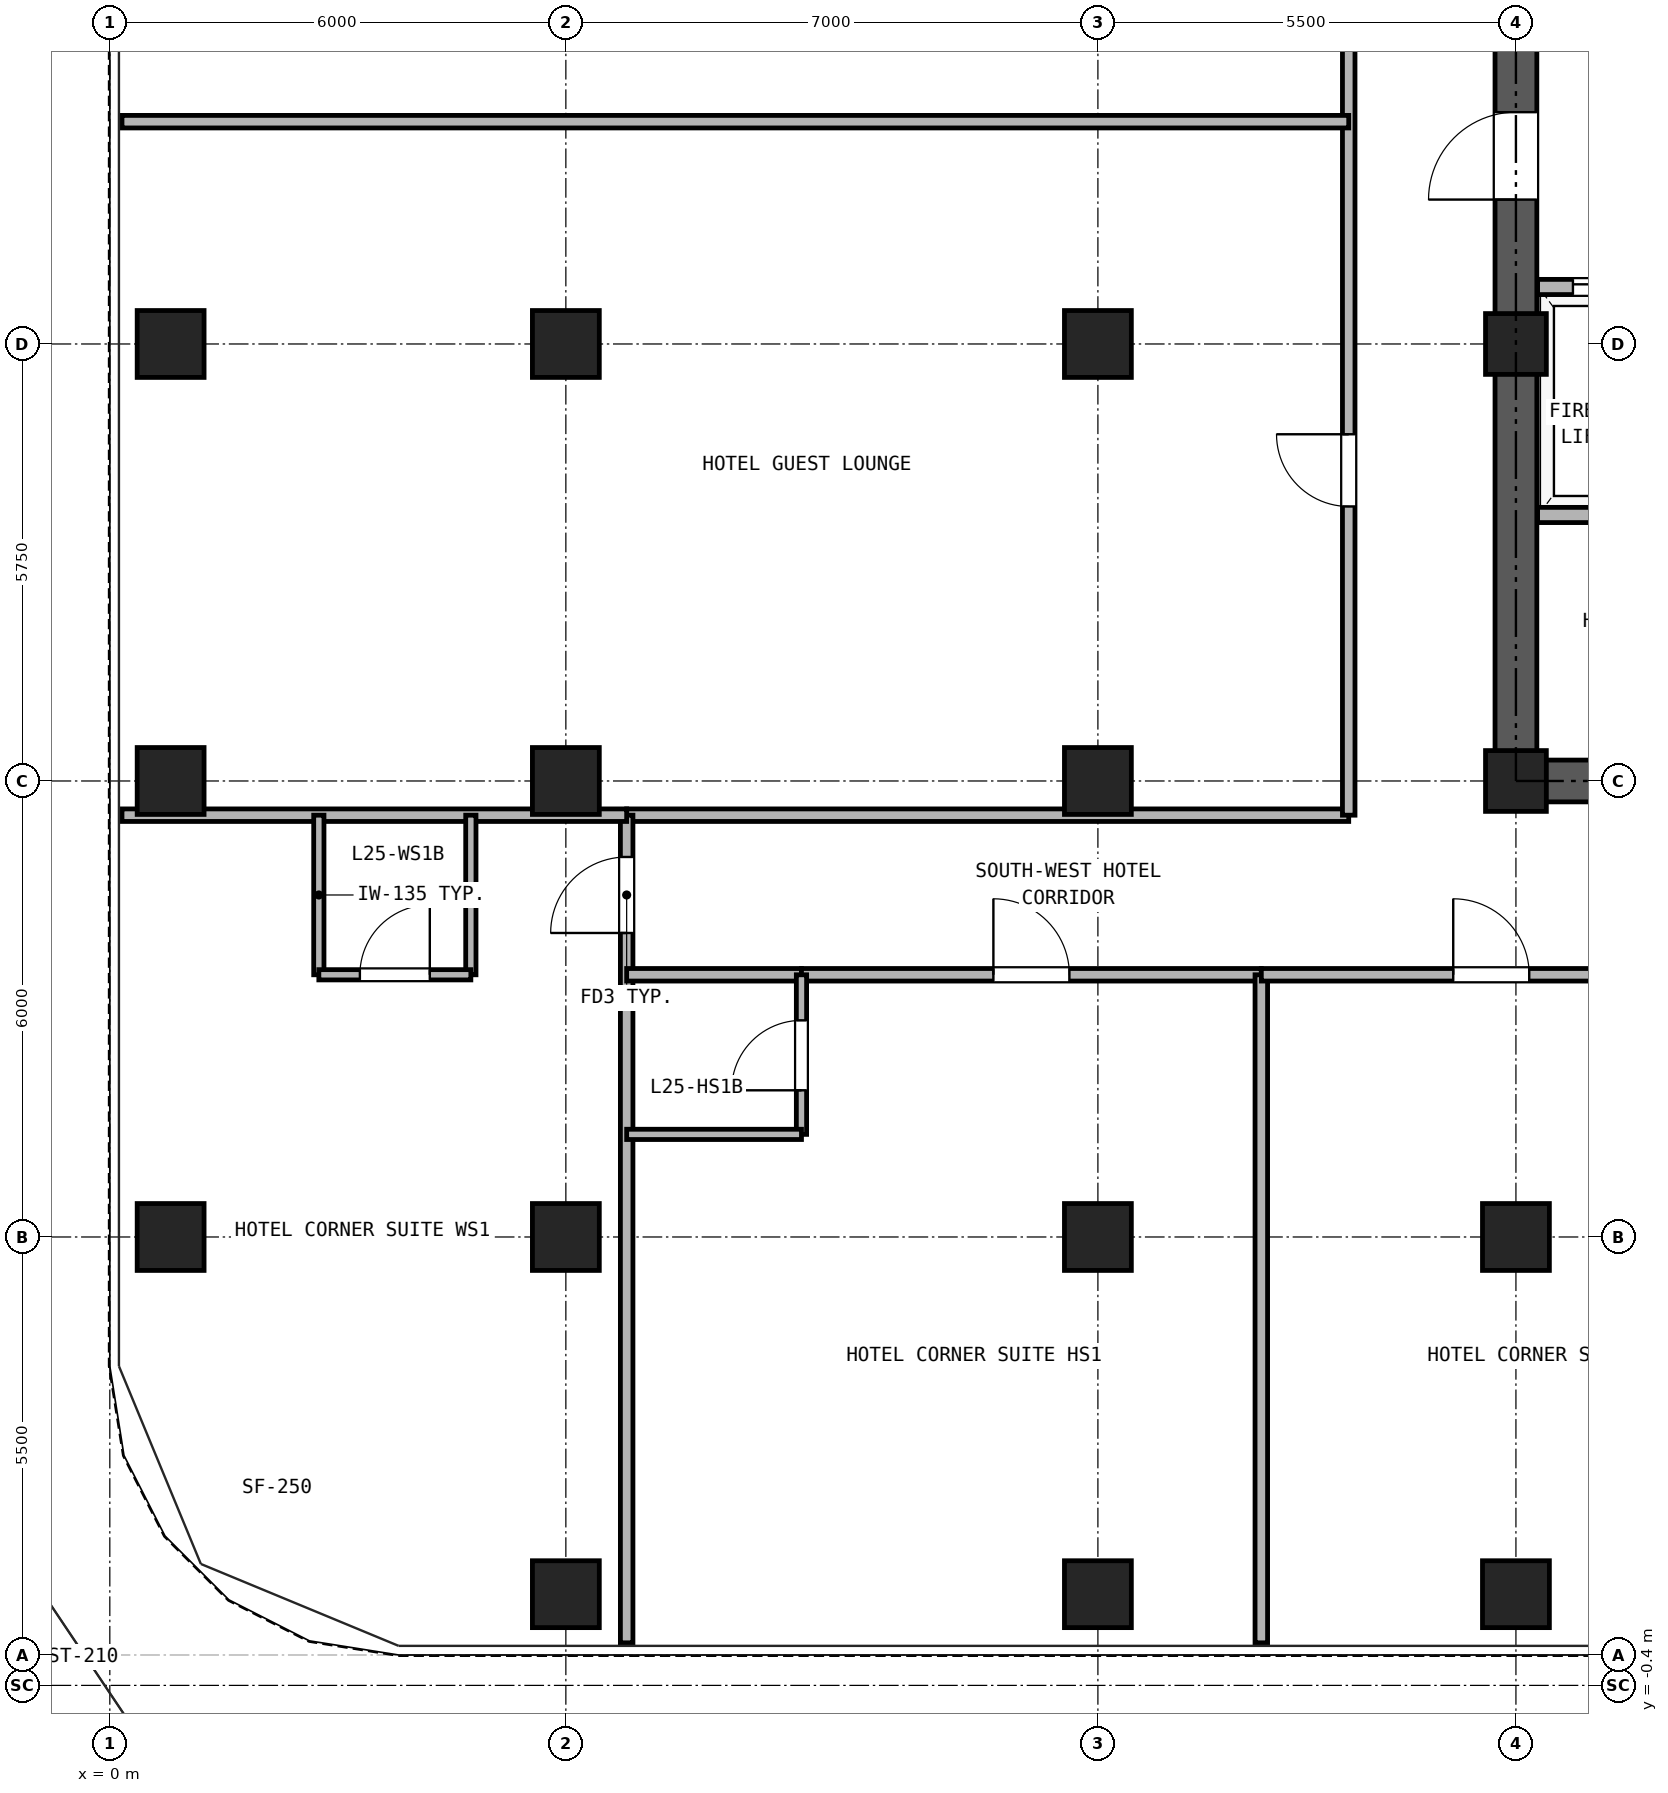
"""IFC4 building model, lengths in metres.
Left out: names, types, materials, properties, quantities, classifications, styles, units other than length and angle.
Written with IfcOpenShell. Run it as: python <this file> out.ifc"""

import sys

from ifc_helpers import new_model, si_unit, direction, frame, frame_2d, origin, origin_2d, place, context, subcontext, project, spatial, rectangle, hollow_rectangle, extrude, source, transform, mapped, element, fill, save


model = new_model("IFC4")
c1 = context("Model", 3, precision=1e-05, world=origin(), true_north=direction((0.0, 1.0)))
c2 = subcontext(c1, "Body", "Model", "MODEL_VIEW")
j1 = project(units=[si_unit("LENGTHUNIT", "METRE"), si_unit("PLANEANGLEUNIT", "RADIAN")], contexts=[c1])
p1 = place(None, origin())
s1 = spatial("IfcSite", under=j1, at=p1, CompositionType="ELEMENT")
p2 = place(p1, origin())
s2 = spatial("IfcBuilding", under=s1, at=p2, CompositionType="ELEMENT")
p3 = place(p2, frame((0.0, 0.0, 95.9)))
s3 = spatial("IfcBuildingStorey", under=s2, at=p3, CompositionType="ELEMENT", Elevation=95.9)
m1 = source(origin(), c2, "Body", "SweptSolid", [
    extrude(hollow_rectangle(XDim=0.88, YDim=0.88, WallThickness=0.05, at=origin_2d()), origin(), (0.0, 0.0, 1.0), 2.95),
])
for number, where, z_axis, x_axis in (
    (1, (6.0, 0.8, 0.0), (0.0, 0.0, 1.0), (1.0, 0.0, 0.0)),
    (2, (13.0, 0.8, 0.0), (0.0, 0.0, 1.0), (1.0, 0.0, 0.0)),
    (3, (18.5, 0.8, 0.0), (0.0, 0.0, 1.0), (1.0, 0.0, 0.0)),
    (4, (0.8, 5.5, 0.0), (0.0, 0.0, 1.0), (1.0, 0.0, 0.0)),
    (5, (0.8, 11.5, 0.0), (0.0, 0.0, 1.0), (1.0, 0.0, 0.0)),
    (6, (0.8, 17.25, 0.0), (0.0, 0.0, 1.0), (1.0, 0.0, 0.0)),
    (7, (6.0, 5.5, 0.0), (0.0, 0.0, 1.0), (1.0, 0.0, 0.0)),
    (8, (6.0, 11.5, 0.0), (0.0, 0.0, 1.0), (1.0, 0.0, 0.0)),
    (9, (6.0, 17.25, 0.0), (0.0, 0.0, 1.0), (1.0, 0.0, 0.0)),
    (10, (13.0, 5.5, 0.0), (0.0, 0.0, 1.0), (1.0, 0.0, 0.0)),
    (11, (13.0, 11.5, 0.0), (0.0, 0.0, 1.0), (1.0, 0.0, 0.0)),
    (12, (13.0, 17.25, 0.0), (0.0, 0.0, 1.0), (1.0, 0.0, 0.0)),
    (13, (18.5, 5.5, 0.0), (0.0, 0.0, 1.0), (1.0, 0.0, 0.0)),
):
    element("IfcColumn", number, at=place(p3, frame(where, z_axis=z_axis, x_axis=x_axis)), inside=s3, PredefinedType="COLUMN", context=c2, shape_type="MappedRepresentation", body=[
        mapped(m1, transform((0.0, 0.0, 0.0), x_axis=(1.0, 0.0, 0.0), y_axis=(0.0, 1.0, 0.0), z_axis=(0.0, 0.0, 1.0), scale=1.0)),
    ])
m2 = source(origin(), c2, "Body", "SweptSolid", [
    extrude(hollow_rectangle(XDim=0.8, YDim=0.8, WallThickness=0.045, at=origin_2d()), origin(), (0.0, 0.0, 1.0), 2.95),
])
for number, where, z_axis, x_axis in (
    (14, (18.5, 11.5, 0.0), (0.0, 0.0, 1.0), (1.0, 0.0, 0.0)),
    (15, (18.5, 17.25, 0.0), (0.0, 0.0, 1.0), (1.0, 0.0, 0.0)),
):
    element("IfcColumn", number, at=place(p3, frame(where, z_axis=z_axis, x_axis=x_axis)), inside=s3, PredefinedType="COLUMN", context=c2, shape_type="MappedRepresentation", body=[
        mapped(m2, transform((0.0, 0.0, 0.0), x_axis=(1.0, 0.0, 0.0), y_axis=(0.0, 1.0, 0.0), z_axis=(0.0, 0.0, 1.0), scale=1.0)),
    ])
p4 = place(p3, frame((18.225, 11.5, 0.0), z_axis=(0.0, 0.0, 1.0), x_axis=(1.0, 0.0, 0.0)))
e16 = element("IfcWall", 16, at=p4, inside=s3, PredefinedType="SHEAR", context=c2, shape_type="SweptSolid", body=[
    extrude(rectangle(XDim=10.55, YDim=0.55, at=frame_2d((5.275, 0.0))), origin(), (0.0, 0.0, 1.0), 2.95),
])
p5 = place(p4, frame((2.375, 0.0, 0.0)))
e17 = element("IfcOpeningElement", 17, at=p5, cuts=e16, PredefinedType="OPENING", context=c2, shape_type="SweptSolid", body=[
    extrude(rectangle(XDim=0.95, YDim=2.15, at=frame_2d((0.475, 1.075))), frame((0.0, 0.285, 0.0), z_axis=(0.0, -1.0, 0.0), x_axis=(1.0, 0.0, 0.0)), (0.0, 0.0, 1.0), 0.57),
])
p6 = place(p4, frame((5.875, 0.0, 0.0)))
e18 = element("IfcOpeningElement", 18, at=p6, cuts=e16, PredefinedType="OPENING", context=c2, shape_type="SweptSolid", body=[
    extrude(rectangle(XDim=1.1, YDim=2.25, at=frame_2d((0.55, 1.125))), frame((0.0, 0.285, 0.0), z_axis=(0.0, -1.0, 0.0), x_axis=(1.0, 0.0, 0.0)), (0.0, 0.0, 1.0), 0.57),
])
p7 = place(p4, frame((8.275, 0.0, 0.0)))
e19 = element("IfcOpeningElement", 19, at=p7, cuts=e16, PredefinedType="OPENING", context=c2, shape_type="SweptSolid", body=[
    extrude(rectangle(XDim=1.1, YDim=2.25, at=frame_2d((0.55, 1.125))), frame((0.0, 0.285, 0.0), z_axis=(0.0, -1.0, 0.0), x_axis=(1.0, 0.0, 0.0)), (0.0, 0.0, 1.0), 0.57),
])
p8 = place(p3, frame((18.5, 11.775, 0.0), z_axis=(0.0, 0.0, 1.0), x_axis=(0.0, 1.0, 0.0)))
e20 = element("IfcWall", 20, at=p8, inside=s3, PredefinedType="SHEAR", context=c2, shape_type="SweptSolid", body=[
    extrude(rectangle(XDim=16.7, YDim=0.55, at=frame_2d((8.35, 0.0))), origin(), (0.0, 0.0, 1.0), 2.95),
])
p9 = place(p8, frame((7.375, 0.0, 0.0)))
e21 = element("IfcOpeningElement", 21, at=p9, cuts=e20, PredefinedType="OPENING", context=c2, shape_type="SweptSolid", body=[
    extrude(rectangle(XDim=1.15, YDim=2.2, at=frame_2d((0.575, 1.1))), frame((0.0, 0.285, 0.0), z_axis=(0.0, -1.0, 0.0), x_axis=(1.0, 0.0, 0.0)), (0.0, 0.0, 1.0), 0.57),
])
p10 = place(p3, frame((18.785, 18.0, 0.0), z_axis=(0.0, 0.0, 1.0), x_axis=(1.0, 0.0, 0.0)))
e22 = element("IfcWall", 22, at=p10, inside=s3, PredefinedType="PARTITIONING", context=c2, shape_type="SweptSolid", body=[
    extrude(rectangle(XDim=9.43, YDim=0.2, at=frame_2d((4.715, 0.0))), origin(), (0.0, 0.0, 1.0), 2.95),
])
p11 = place(p10, frame((0.465, 0.0, 0.0)))
e23 = element("IfcOpeningElement", 23, at=p11, cuts=e22, PredefinedType="OPENING", context=c2, shape_type="SweptSolid", body=[
    extrude(rectangle(XDim=1.3, YDim=2.3, at=frame_2d((0.65, 1.15))), frame((0.0, 0.11, 0.0), z_axis=(0.0, -1.0, 0.0), x_axis=(1.0, 0.0, 0.0)), (0.0, 0.0, 1.0), 0.22),
])
p12 = place(p10, frame((2.565, 0.0, 0.0)))
e24 = element("IfcOpeningElement", 24, at=p12, cuts=e22, PredefinedType="OPENING", context=c2, shape_type="SweptSolid", body=[
    extrude(rectangle(XDim=1.3, YDim=2.3, at=frame_2d((0.65, 1.15))), frame((0.0, 0.11, 0.0), z_axis=(0.0, -1.0, 0.0), x_axis=(1.0, 0.0, 0.0)), (0.0, 0.0, 1.0), 0.22),
])
p13 = place(p10, frame((4.965, 0.0, 0.0)))
e25 = element("IfcOpeningElement", 25, at=p13, cuts=e22, PredefinedType="OPENING", context=c2, shape_type="SweptSolid", body=[
    extrude(rectangle(XDim=0.9, YDim=2.05, at=frame_2d((0.45, 1.025))), frame((0.0, 0.11, 0.0), z_axis=(0.0, -1.0, 0.0), x_axis=(1.0, 0.0, 0.0)), (0.0, 0.0, 1.0), 0.22),
])
p14 = place(p10, frame((7.665, 0.0, 0.0)))
e26 = element("IfcOpeningElement", 26, at=p14, cuts=e22, PredefinedType="OPENING", context=c2, shape_type="SweptSolid", body=[
    extrude(rectangle(XDim=0.9, YDim=2.05, at=frame_2d((0.45, 1.025))), frame((0.0, 0.11, 0.0), z_axis=(0.0, -1.0, 0.0), x_axis=(1.0, 0.0, 0.0)), (0.0, 0.0, 1.0), 0.22),
])
p15 = place(p3, frame((18.785, 15.0, 0.0), z_axis=(0.0, 0.0, 1.0), x_axis=(1.0, 0.0, 0.0)))
e27 = element("IfcWall", 27, at=p15, inside=s3, PredefinedType="PARTITIONING", context=c2, shape_type="SweptSolid", body=[
    extrude(rectangle(XDim=9.43, YDim=0.2, at=frame_2d((4.715, 0.0))), origin(), (0.0, 0.0, 1.0), 2.95),
])
p16 = place(p3, frame((6.8, 11.05, 0.0), z_axis=(0.0, 0.0, 1.0), x_axis=(1.0, 0.0, 0.0)))
e28 = element("IfcWall", 28, at=p16, inside=s3, PredefinedType="PARTITIONING", context=c2, shape_type="SweptSolid", body=[
    extrude(rectangle(XDim=9.5, YDim=0.165, at=frame_2d((4.75, 0.0))), origin(), (0.0, 0.0, 1.0), 2.95),
])
p17 = place(p3, frame((16.3, 11.05, 0.0), z_axis=(0.0, 0.0, 1.0), x_axis=(0.0, 1.0, 0.0)))
e29 = element("IfcWall", 29, at=p17, inside=s3, PredefinedType="PARTITIONING", context=c2, shape_type="SweptSolid", body=[
    extrude(rectangle(XDim=18.25, YDim=0.165, at=frame_2d((9.125, 0.0))), origin(), (0.0, 0.0, 1.0), 2.95),
])
p18 = place(p17, frame((4.062, 0.0, 0.0)))
e30 = element("IfcOpeningElement", 30, at=p18, cuts=e29, PredefinedType="OPENING", context=c2, shape_type="SweptSolid", body=[
    extrude(rectangle(XDim=0.95, YDim=2.15, at=frame_2d((0.475, 1.075))), frame((0.0, 0.093, 0.0), z_axis=(0.0, -1.0, 0.0), x_axis=(1.0, 0.0, 0.0)), (0.0, 0.0, 1.0), 0.185),
])
p19 = place(p17, frame((13.187, 0.0, 0.0)))
e31 = element("IfcOpeningElement", 31, at=p19, cuts=e29, PredefinedType="OPENING", context=c2, shape_type="SweptSolid", body=[
    extrude(rectangle(XDim=0.95, YDim=2.15, at=frame_2d((0.475, 1.075))), frame((0.0, 0.093, 0.0), z_axis=(0.0, -1.0, 0.0), x_axis=(1.0, 0.0, 0.0)), (0.0, 0.0, 1.0), 0.185),
])
p20 = place(p3, frame((6.8, 0.16, 0.0), z_axis=(0.0, 0.0, 1.0), x_axis=(0.0, 1.0, 0.0)))
e32 = element("IfcWall", 32, at=p20, inside=s3, PredefinedType="PARTITIONING", context=c2, shape_type="SweptSolid", body=[
    extrude(rectangle(XDim=10.89, YDim=0.165, at=frame_2d((5.445, 0.0))), origin(), (0.0, 0.0, 1.0), 2.95),
])
p21 = place(p20, frame((9.34, 0.0, 0.0)))
e33 = element("IfcOpeningElement", 33, at=p21, cuts=e32, PredefinedType="OPENING", context=c2, shape_type="SweptSolid", body=[
    extrude(rectangle(XDim=1.0, YDim=2.15, at=frame_2d((0.5, 1.075))), frame((0.0, 0.093, 0.0), z_axis=(0.0, -1.0, 0.0), x_axis=(1.0, 0.0, 0.0)), (0.0, 0.0, 1.0), 0.185),
])
p22 = place(p3, frame((0.16, 11.05, 0.0), z_axis=(0.0, 0.0, 1.0), x_axis=(1.0, 0.0, 0.0)))
e34 = element("IfcWall", 34, at=p22, inside=s3, PredefinedType="PARTITIONING", context=c2, shape_type="SweptSolid", body=[
    extrude(rectangle(XDim=6.64, YDim=0.165, at=frame_2d((3.32, 0.0))), origin(), (0.0, 0.0, 1.0), 2.95),
])
for number, where, z_axis, x_axis in (
    (35, (2.75, 8.95, 0.0), (0.0, 0.0, 1.0), (0.0, 1.0, 0.0)),
    (36, (4.75, 8.95, 0.0), (0.0, 0.0, 1.0), (0.0, 1.0, 0.0)),
):
    element("IfcWall", number, at=place(p3, frame(where, z_axis=z_axis, x_axis=x_axis)), inside=s3, PredefinedType="PARTITIONING", context=c2, shape_type="SweptSolid", body=[
        extrude(rectangle(XDim=2.1, YDim=0.135, at=frame_2d((1.05, 0.0))), origin(), (0.0, 0.0, 1.0), 2.95),
    ])
p23 = place(p3, frame((2.75, 8.95, 0.0), z_axis=(0.0, 0.0, 1.0), x_axis=(1.0, 0.0, 0.0)))
e37 = element("IfcWall", 37, at=p23, inside=s3, PredefinedType="PARTITIONING", context=c2, shape_type="SweptSolid", body=[
    extrude(rectangle(XDim=2.0, YDim=0.135, at=frame_2d((1.0, 0.0))), origin(), (0.0, 0.0, 1.0), 2.95),
])
p24 = place(p23, frame((0.54, 0.0, 0.0)))
e38 = element("IfcOpeningElement", 38, at=p24, cuts=e37, PredefinedType="OPENING", context=c2, shape_type="SweptSolid", body=[
    extrude(rectangle(XDim=0.92, YDim=2.1, at=frame_2d((0.46, 1.05))), frame((0.0, 0.077, 0.0), z_axis=(0.0, -1.0, 0.0), x_axis=(1.0, 0.0, 0.0)), (0.0, 0.0, 1.0), 0.155),
])
p25 = place(p3, frame((6.8, 8.95, 0.0), z_axis=(0.0, 0.0, 1.0), x_axis=(1.0, 0.0, 0.0)))
e39 = element("IfcWall", 39, at=p25, inside=s3, PredefinedType="PARTITIONING", context=c2, shape_type="SweptSolid", body=[
    extrude(rectangle(XDim=2.3, YDim=0.165, at=frame_2d((1.15, 0.0))), origin(), (0.0, 0.0, 1.0), 2.95),
])
p26 = place(p3, frame((9.1, 8.95, 0.0), z_axis=(0.0, 0.0, 1.0), x_axis=(1.0, 0.0, 0.0)))
e40 = element("IfcWall", 40, at=p26, inside=s3, PredefinedType="PARTITIONING", context=c2, shape_type="SweptSolid", body=[
    extrude(rectangle(XDim=6.05, YDim=0.165, at=frame_2d((3.025, 0.0))), origin(), (0.0, 0.0, 1.0), 2.95),
])
p27 = place(p26, frame((2.525, 0.0, 0.0)))
e41 = element("IfcOpeningElement", 41, at=p27, cuts=e40, PredefinedType="OPENING", context=c2, shape_type="SweptSolid", body=[
    extrude(rectangle(XDim=1.0, YDim=2.15, at=frame_2d((0.5, 1.075))), frame((0.0, 0.093, 0.0), z_axis=(0.0, -1.0, 0.0), x_axis=(1.0, 0.0, 0.0)), (0.0, 0.0, 1.0), 0.185),
])
p28 = place(p3, frame((9.1, 6.85, 0.0), z_axis=(0.0, 0.0, 1.0), x_axis=(0.0, 1.0, 0.0)))
e42 = element("IfcWall", 42, at=p28, inside=s3, PredefinedType="PARTITIONING", context=c2, shape_type="SweptSolid", body=[
    extrude(rectangle(XDim=2.1, YDim=0.135, at=frame_2d((1.05, 0.0))), origin(), (0.0, 0.0, 1.0), 2.95),
])
p29 = place(p28, frame((0.58, 0.0, 0.0)))
e43 = element("IfcOpeningElement", 43, at=p29, cuts=e42, PredefinedType="OPENING", context=c2, shape_type="SweptSolid", body=[
    extrude(rectangle(XDim=0.92, YDim=2.1, at=frame_2d((0.46, 1.05))), frame((0.0, 0.077, 0.0), z_axis=(0.0, -1.0, 0.0), x_axis=(1.0, 0.0, 0.0)), (0.0, 0.0, 1.0), 0.155),
])
p30 = place(p3, frame((6.8, 6.85, 0.0), z_axis=(0.0, 0.0, 1.0), x_axis=(1.0, 0.0, 0.0)))
e44 = element("IfcWall", 44, at=p30, inside=s3, PredefinedType="PARTITIONING", context=c2, shape_type="SweptSolid", body=[
    extrude(rectangle(XDim=2.3, YDim=0.135, at=frame_2d((1.15, 0.0))), origin(), (0.0, 0.0, 1.0), 2.95),
])
p31 = place(p3, frame((15.15, 0.16, 0.0), z_axis=(0.0, 0.0, 1.0), x_axis=(0.0, 1.0, 0.0)))
e45 = element("IfcWall", 45, at=p31, inside=s3, PredefinedType="PARTITIONING", context=c2, shape_type="SweptSolid", body=[
    extrude(rectangle(XDim=8.79, YDim=0.165, at=frame_2d((4.395, 0.0))), origin(), (0.0, 0.0, 1.0), 2.95),
])
p32 = place(p3, frame((15.15, 8.95, 0.0), z_axis=(0.0, 0.0, 1.0), x_axis=(1.0, 0.0, 0.0)))
e46 = element("IfcWall", 46, at=p32, inside=s3, PredefinedType="PARTITIONING", context=c2, shape_type="SweptSolid", body=[
    extrude(rectangle(XDim=6.05, YDim=0.165, at=frame_2d((3.025, 0.0))), origin(), (0.0, 0.0, 1.0), 2.95),
])
p33 = place(p32, frame((2.525, 0.0, 0.0)))
e47 = element("IfcOpeningElement", 47, at=p33, cuts=e46, PredefinedType="OPENING", context=c2, shape_type="SweptSolid", body=[
    extrude(rectangle(XDim=1.0, YDim=2.15, at=frame_2d((0.5, 1.075))), frame((0.0, 0.093, 0.0), z_axis=(0.0, -1.0, 0.0), x_axis=(1.0, 0.0, 0.0)), (0.0, 0.0, 1.0), 0.185),
])
p34 = place(p3, frame((0.16, 20.175, 0.0), z_axis=(0.0, 0.0, 1.0), x_axis=(1.0, 0.0, 0.0)))
e48 = element("IfcWall", 48, at=p34, inside=s3, PredefinedType="PARTITIONING", context=c2, shape_type="SweptSolid", body=[
    extrude(rectangle(XDim=16.14, YDim=0.165, at=frame_2d((8.07, 0.0))), origin(), (0.0, 0.0, 1.0), 2.583),
])
p35 = place(p11, origin())
e49 = element("IfcDoor", 49, at=p35, inside=s3, OperationType="DOUBLE_DOOR_SLIDING", PredefinedType="DOOR", context=c2, shape_type="SweptSolid", body=[
    extrude(rectangle(XDim=1.3, YDim=2.3, at=frame_2d((0.65, 1.15))), frame((0.0, 0.025, 0.0), z_axis=(0.0, -1.0, 0.0), x_axis=(1.0, 0.0, 0.0)), (0.0, 0.0, 1.0), 0.05),
])
fill(e23, e49)
p36 = place(p9, frame((1.15, 0.0, 0.0), z_axis=(0.0, 0.0, 1.0), x_axis=(-1.0, 0.0, 0.0)))
e50 = element("IfcDoor", 50, at=p36, inside=s3, OperationType="SINGLE_SWING_LEFT", PredefinedType="DOOR", context=c2, shape_type="SweptSolid", body=[
    extrude(rectangle(XDim=1.15, YDim=2.2, at=frame_2d((0.575, 1.1))), frame((0.0, 0.025, 0.0), z_axis=(0.0, -1.0, 0.0), x_axis=(1.0, 0.0, 0.0)), (0.0, 0.0, 1.0), 0.05),
])
fill(e21, e50)
p37 = place(p24, origin())
e51 = element("IfcDoor", 51, at=p37, inside=s3, OperationType="SINGLE_SWING_RIGHT", PredefinedType="DOOR", context=c2, shape_type="SweptSolid", body=[
    extrude(rectangle(XDim=0.92, YDim=2.1, at=frame_2d((0.46, 1.05))), frame((0.0, 0.025, 0.0), z_axis=(0.0, -1.0, 0.0), x_axis=(1.0, 0.0, 0.0)), (0.0, 0.0, 1.0), 0.05),
])
fill(e38, e51)
p38 = place(p21, origin())
e52 = element("IfcDoor", 52, at=p38, inside=s3, OperationType="SINGLE_SWING_LEFT", PredefinedType="DOOR", context=c2, shape_type="SweptSolid", body=[
    extrude(rectangle(XDim=1.0, YDim=2.15, at=frame_2d((0.5, 1.075))), frame((0.0, 0.025, 0.0), z_axis=(0.0, -1.0, 0.0), x_axis=(1.0, 0.0, 0.0)), (0.0, 0.0, 1.0), 0.05),
])
fill(e33, e52)
p39 = place(p29, frame((0.92, 0.0, 0.0), z_axis=(0.0, 0.0, 1.0), x_axis=(-1.0, 0.0, 0.0)))
e53 = element("IfcDoor", 53, at=p39, inside=s3, OperationType="SINGLE_SWING_LEFT", PredefinedType="DOOR", context=c2, shape_type="SweptSolid", body=[
    extrude(rectangle(XDim=0.92, YDim=2.1, at=frame_2d((0.46, 1.05))), frame((0.0, 0.025, 0.0), z_axis=(0.0, -1.0, 0.0), x_axis=(1.0, 0.0, 0.0)), (0.0, 0.0, 1.0), 0.05),
])
fill(e43, e53)
p40 = place(p27, frame((1.0, 0.0, 0.0), z_axis=(0.0, 0.0, 1.0), x_axis=(-1.0, 0.0, 0.0)))
e54 = element("IfcDoor", 54, at=p40, inside=s3, OperationType="SINGLE_SWING_LEFT", PredefinedType="DOOR", context=c2, shape_type="SweptSolid", body=[
    extrude(rectangle(XDim=1.0, YDim=2.15, at=frame_2d((0.5, 1.075))), frame((0.0, 0.025, 0.0), z_axis=(0.0, -1.0, 0.0), x_axis=(1.0, 0.0, 0.0)), (0.0, 0.0, 1.0), 0.05),
])
fill(e41, e54)
p41 = place(p33, frame((1.0, 0.0, 0.0), z_axis=(0.0, 0.0, 1.0), x_axis=(-1.0, 0.0, 0.0)))
e55 = element("IfcDoor", 55, at=p41, inside=s3, OperationType="SINGLE_SWING_LEFT", PredefinedType="DOOR", context=c2, shape_type="SweptSolid", body=[
    extrude(rectangle(XDim=1.0, YDim=2.15, at=frame_2d((0.5, 1.075))), frame((0.0, 0.025, 0.0), z_axis=(0.0, -1.0, 0.0), x_axis=(1.0, 0.0, 0.0)), (0.0, 0.0, 1.0), 0.05),
])
fill(e47, e55)
p42 = place(p18, frame((0.95, 0.0, 0.0), z_axis=(0.0, 0.0, 1.0), x_axis=(-1.0, 0.0, 0.0)))
e56 = element("IfcDoor", 56, at=p42, inside=s3, OperationType="SINGLE_SWING_RIGHT", PredefinedType="DOOR", context=c2, shape_type="SweptSolid", body=[
    extrude(rectangle(XDim=0.95, YDim=2.15, at=frame_2d((0.475, 1.075))), frame((0.0, 0.025, 0.0), z_axis=(0.0, -1.0, 0.0), x_axis=(1.0, 0.0, 0.0)), (0.0, 0.0, 1.0), 0.05),
])
fill(e30, e56)
save(model, sys.argv[1])
